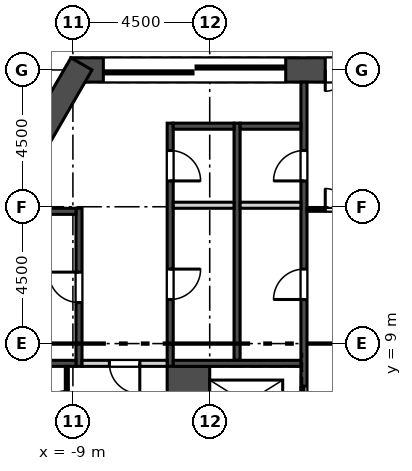
"""IFC4 building model, lengths in metres.
Left out: names, types, materials, properties, quantities, classifications, styles, units other than length and angle.
Written with IfcOpenShell. Run it as: python <this file> out.ifc"""

import sys

from ifc_helpers import new_model, si_unit, direction, frame, frame_2d, origin, place, context, subcontext, project, spatial, rectangle, extrude, element, fill, save


model = new_model("IFC4")
c1 = context("Model", 3, precision=1e-05, world=origin(), true_north=direction((0.0, 1.0)))
c2 = subcontext(c1, "Body", "Model", "MODEL_VIEW")
j1 = project(units=[si_unit("LENGTHUNIT", "METRE"), si_unit("PLANEANGLEUNIT", "RADIAN")], contexts=[c1])
p1 = place(None, origin())
s1 = spatial("IfcSite", under=j1, at=p1, CompositionType="ELEMENT")
p2 = place(p1, origin())
s2 = spatial("IfcBuilding", under=s1, at=p2, CompositionType="ELEMENT")
p3 = place(p2, frame((0.0, 0.0, 335.1)))
s3 = spatial("IfcBuildingStorey", under=s2, at=p3, CompositionType="ELEMENT", Elevation=335.1)
p4 = place(p3, frame((9.065, 18.0, 0.0), z_axis=(0.0, 0.0, 1.0), x_axis=(-1.0, 0.0, 0.0)))
e1 = element("IfcWall", 1, at=p4, inside=s3, PredefinedType="SHEAR", context=c2, shape_type="SweptSolid", body=[
    extrude(rectangle(XDim=18.13, YDim=0.8, at=frame_2d((9.065, 0.0))), origin(), (0.0, 0.0, 1.0), 4.2),
])
p5 = place(p4, frame((8.365, 0.0, 0.0)))
e2 = element("IfcOpeningElement", 2, at=p5, cuts=e1, PredefinedType="OPENING", context=c2, shape_type="SweptSolid", body=[
    extrude(rectangle(XDim=1.4, YDim=2.1, at=frame_2d((0.7, 1.05))), frame((0.0, 0.41, 0.0), z_axis=(0.0, -1.0, 0.0), x_axis=(1.0, 0.0, 0.0)), (0.0, 0.0, 1.0), 0.82),
])
p6 = place(p4, frame((11.065, 0.0, 0.0)))
e3 = element("IfcOpeningElement", 3, at=p6, cuts=e1, PredefinedType="OPENING", context=c2, shape_type="SweptSolid", body=[
    extrude(rectangle(XDim=6.0, YDim=2.4, at=frame_2d((3.0, 1.2))), frame((0.0, 0.41, 0.0), z_axis=(0.0, -1.0, 0.0), x_axis=(1.0, 0.0, 0.0)), (0.0, 0.0, 1.0), 0.82),
])
p7 = place(p4, frame((1.065, 0.0, 0.0)))
e4 = element("IfcOpeningElement", 4, at=p7, cuts=e1, PredefinedType="OPENING", context=c2, shape_type="SweptSolid", body=[
    extrude(rectangle(XDim=6.0, YDim=2.4, at=frame_2d((3.0, 1.2))), frame((0.0, 0.41, 0.0), z_axis=(0.0, -1.0, 0.0), x_axis=(1.0, 0.0, 0.0)), (0.0, 0.0, 1.0), 0.82),
])
p8 = place(p3, frame((-8.719, 18.2, 0.0), z_axis=(0.0, 0.0, 1.0), x_axis=(-0.500015780397, -0.866016292776, 0.0)))
e5 = element("IfcWall", 5, at=p8, inside=s3, PredefinedType="SHEAR", context=c2, shape_type="SweptSolid", body=[
    extrude(rectangle(XDim=8.67, YDim=0.8, at=frame_2d((4.335, 0.0))), origin(), (0.0, 0.0, 1.0), 4.2),
])
p9 = place(p3, frame((-4.353, 41.372, 0.0), z_axis=(0.0, 0.0, 1.0), x_axis=(-0.500001731347, -0.866024404189, 0.0)))
e6 = element("IfcWall", 6, at=p9, inside=s3, PredefinedType="SOLIDWALL", context=c2, shape_type="SweptSolid", body=[
    extrude(rectangle(XDim=38.87, YDim=0.34, at=frame_2d((19.435, 0.0))), origin(), (0.0, 0.0, 1.0), 3.8),
])
p10 = place(p9, frame((3.653, 0.0, 0.9)))
e7 = element("IfcOpeningElement", 7, at=p10, cuts=e6, PredefinedType="OPENING", context=c2, shape_type="SweptSolid", body=[
    extrude(rectangle(XDim=1.885, YDim=2.6, at=frame_2d((0.942, 1.3))), frame((0.0, 0.18, 0.0), z_axis=(0.0, -1.0, 0.0), x_axis=(1.0, 0.0, 0.0)), (0.0, 0.0, 1.0), 0.36),
])
p11 = place(p9, frame((6.653, 0.0, 0.9)))
e8 = element("IfcOpeningElement", 8, at=p11, cuts=e6, PredefinedType="OPENING", context=c2, shape_type="SweptSolid", body=[
    extrude(rectangle(XDim=1.885, YDim=2.6, at=frame_2d((0.942, 1.3))), frame((0.0, 0.18, 0.0), z_axis=(0.0, -1.0, 0.0), x_axis=(1.0, 0.0, 0.0)), (0.0, 0.0, 1.0), 0.36),
])
p12 = place(p9, frame((9.653, 0.0, 0.9)))
e9 = element("IfcOpeningElement", 9, at=p12, cuts=e6, PredefinedType="OPENING", context=c2, shape_type="SweptSolid", body=[
    extrude(rectangle(XDim=1.885, YDim=2.6, at=frame_2d((0.942, 1.3))), frame((0.0, 0.18, 0.0), z_axis=(0.0, -1.0, 0.0), x_axis=(1.0, 0.0, 0.0)), (0.0, 0.0, 1.0), 0.36),
])
p13 = place(p9, frame((12.653, 0.0, 0.9)))
e10 = element("IfcOpeningElement", 10, at=p13, cuts=e6, PredefinedType="OPENING", context=c2, shape_type="SweptSolid", body=[
    extrude(rectangle(XDim=1.885, YDim=2.6, at=frame_2d((0.942, 1.3))), frame((0.0, 0.18, 0.0), z_axis=(0.0, -1.0, 0.0), x_axis=(1.0, 0.0, 0.0)), (0.0, 0.0, 1.0), 0.36),
])
p14 = place(p9, frame((15.653, 0.0, 0.9)))
e11 = element("IfcOpeningElement", 11, at=p14, cuts=e6, PredefinedType="OPENING", context=c2, shape_type="SweptSolid", body=[
    extrude(rectangle(XDim=1.885, YDim=2.6, at=frame_2d((0.942, 1.3))), frame((0.0, 0.18, 0.0), z_axis=(0.0, -1.0, 0.0), x_axis=(1.0, 0.0, 0.0)), (0.0, 0.0, 1.0), 0.36),
])
p15 = place(p9, frame((18.653, 0.0, 0.9)))
e12 = element("IfcOpeningElement", 12, at=p15, cuts=e6, PredefinedType="OPENING", context=c2, shape_type="SweptSolid", body=[
    extrude(rectangle(XDim=1.885, YDim=2.6, at=frame_2d((0.942, 1.3))), frame((0.0, 0.18, 0.0), z_axis=(0.0, -1.0, 0.0), x_axis=(1.0, 0.0, 0.0)), (0.0, 0.0, 1.0), 0.36),
])
p16 = place(p9, frame((21.653, 0.0, 0.9)))
e13 = element("IfcOpeningElement", 13, at=p16, cuts=e6, PredefinedType="OPENING", context=c2, shape_type="SweptSolid", body=[
    extrude(rectangle(XDim=1.885, YDim=2.6, at=frame_2d((0.942, 1.3))), frame((0.0, 0.18, 0.0), z_axis=(0.0, -1.0, 0.0), x_axis=(1.0, 0.0, 0.0)), (0.0, 0.0, 1.0), 0.36),
])
p17 = place(p9, frame((24.653, 0.0, 0.9)))
e14 = element("IfcOpeningElement", 14, at=p17, cuts=e6, PredefinedType="OPENING", context=c2, shape_type="SweptSolid", body=[
    extrude(rectangle(XDim=1.885, YDim=2.6, at=frame_2d((0.942, 1.3))), frame((0.0, 0.18, 0.0), z_axis=(0.0, -1.0, 0.0), x_axis=(1.0, 0.0, 0.0)), (0.0, 0.0, 1.0), 0.36),
])
p18 = place(p9, frame((27.653, 0.0, 0.9)))
e15 = element("IfcOpeningElement", 15, at=p18, cuts=e6, PredefinedType="OPENING", context=c2, shape_type="SweptSolid", body=[
    extrude(rectangle(XDim=1.885, YDim=2.6, at=frame_2d((0.942, 1.3))), frame((0.0, 0.18, 0.0), z_axis=(0.0, -1.0, 0.0), x_axis=(1.0, 0.0, 0.0)), (0.0, 0.0, 1.0), 0.36),
])
p19 = place(p9, frame((30.653, 0.0, 0.9)))
e16 = element("IfcOpeningElement", 16, at=p19, cuts=e6, PredefinedType="OPENING", context=c2, shape_type="SweptSolid", body=[
    extrude(rectangle(XDim=1.885, YDim=2.6, at=frame_2d((0.942, 1.3))), frame((0.0, 0.18, 0.0), z_axis=(0.0, -1.0, 0.0), x_axis=(1.0, 0.0, 0.0)), (0.0, 0.0, 1.0), 0.36),
])
p20 = place(p9, frame((33.653, 0.0, 0.9)))
e17 = element("IfcOpeningElement", 17, at=p20, cuts=e6, PredefinedType="OPENING", context=c2, shape_type="SweptSolid", body=[
    extrude(rectangle(XDim=1.885, YDim=2.6, at=frame_2d((0.942, 1.3))), frame((0.0, 0.18, 0.0), z_axis=(0.0, -1.0, 0.0), x_axis=(1.0, 0.0, 0.0)), (0.0, 0.0, 1.0), 0.36),
])
p21 = place(p9, frame((1.269, 0.0, 0.9)))
e18 = element("IfcOpeningElement", 18, at=p21, cuts=e6, PredefinedType="OPENING", context=c2, shape_type="SweptSolid", body=[
    extrude(rectangle(XDim=1.115, YDim=2.4, at=frame_2d((0.558, 1.2))), frame((0.0, 0.18, 0.0), z_axis=(0.0, -1.0, 0.0), x_axis=(1.0, 0.0, 0.0)), (0.0, 0.0, 1.0), 0.36),
])
p22 = place(p9, frame((36.646, 0.0, 0.9)))
e19 = element("IfcOpeningElement", 19, at=p22, cuts=e6, PredefinedType="OPENING", context=c2, shape_type="SweptSolid", body=[
    extrude(rectangle(XDim=1.115, YDim=2.4, at=frame_2d((0.558, 1.2))), frame((0.0, 0.18, 0.0), z_axis=(0.0, -1.0, 0.0), x_axis=(1.0, 0.0, 0.0)), (0.0, 0.0, 1.0), 0.36),
])
p23 = place(p3, frame((-8.8, 8.25, -0.4), z_axis=(0.0, 0.0, 1.0), x_axis=(0.0, 1.0, 0.0)))
e20 = element("IfcWall", 20, at=p23, inside=s3, PredefinedType="SOLIDWALL", context=c2, shape_type="SweptSolid", body=[
    extrude(rectangle(XDim=5.2, YDim=0.2, at=frame_2d((2.6, 0.0))), origin(), (0.0, 0.0, 1.0), 4.2),
])
p24 = place(p23, frame((2.1, 0.0, 0.4)))
e21 = element("IfcOpeningElement", 21, at=p24, cuts=e20, PredefinedType="OPENING", context=c2, shape_type="SweptSolid", body=[
    extrude(rectangle(XDim=1.0, YDim=2.1, at=frame_2d((0.5, 1.05))), frame((0.0, 0.11, 0.0), z_axis=(0.0, -1.0, 0.0), x_axis=(1.0, 0.0, 0.0)), (0.0, 0.0, 1.0), 0.22),
])
p25 = place(p3, frame((-5.8, 8.25, -0.4), z_axis=(0.0, 0.0, 1.0), x_axis=(0.0, 1.0, 0.0)))
e22 = element("IfcWall", 22, at=p25, inside=s3, PredefinedType="SOLIDWALL", context=c2, shape_type="SweptSolid", body=[
    extrude(rectangle(XDim=8.0, YDim=0.2, at=frame_2d((4.0, 0.0))), origin(), (0.0, 0.0, 1.0), 4.2),
])
p26 = place(p25, frame((2.2, 0.0, 0.4)))
e23 = element("IfcOpeningElement", 23, at=p26, cuts=e22, PredefinedType="OPENING", context=c2, shape_type="SweptSolid", body=[
    extrude(rectangle(XDim=1.0, YDim=2.1, at=frame_2d((0.5, 1.05))), frame((0.0, 0.11, 0.0), z_axis=(0.0, -1.0, 0.0), x_axis=(1.0, 0.0, 0.0)), (0.0, 0.0, 1.0), 0.22),
])
p27 = place(p25, frame((6.1, 0.0, 0.4)))
e24 = element("IfcOpeningElement", 24, at=p27, cuts=e22, PredefinedType="OPENING", context=c2, shape_type="SweptSolid", body=[
    extrude(rectangle(XDim=1.0, YDim=2.1, at=frame_2d((0.5, 1.05))), frame((0.0, 0.11, 0.0), z_axis=(0.0, -1.0, 0.0), x_axis=(1.0, 0.0, 0.0)), (0.0, 0.0, 1.0), 0.22),
])
p28 = place(p3, frame((-3.6, 8.45, -0.4), z_axis=(0.0, 0.0, 1.0), x_axis=(0.0, 1.0, 0.0)))
e25 = element("IfcWall", 25, at=p28, inside=s3, PredefinedType="SOLIDWALL", context=c2, shape_type="SweptSolid", body=[
    extrude(rectangle(XDim=7.8, YDim=0.2, at=frame_2d((3.9, 0.0))), origin(), (0.0, 0.0, 1.0), 4.2),
])
p29 = place(p3, frame((-1.4, 5.85, -0.4), z_axis=(0.0, 0.0, 1.0), x_axis=(0.0, 1.0, 0.0)))
e26 = element("IfcWall", 26, at=p29, inside=s3, PredefinedType="SOLIDWALL", context=c2, shape_type="SweptSolid", body=[
    extrude(rectangle(XDim=11.75, YDim=0.2, at=frame_2d((5.875, 0.0))), origin(), (0.0, 0.0, 1.0), 4.2),
])
p30 = place(p29, frame((0.65, 0.0, 0.4)))
e27 = element("IfcOpeningElement", 27, at=p30, cuts=e26, PredefinedType="OPENING", context=c2, shape_type="SweptSolid", body=[
    extrude(rectangle(XDim=1.1, YDim=2.1, at=frame_2d((0.55, 1.05))), frame((0.0, 0.11, 0.0), z_axis=(0.0, -1.0, 0.0), x_axis=(1.0, 0.0, 0.0)), (0.0, 0.0, 1.0), 0.22),
])
p31 = place(p29, frame((4.6, 0.0, 0.4)))
e28 = element("IfcOpeningElement", 28, at=p31, cuts=e26, PredefinedType="OPENING", context=c2, shape_type="SweptSolid", body=[
    extrude(rectangle(XDim=1.0, YDim=2.1, at=frame_2d((0.5, 1.05))), frame((0.0, 0.11, 0.0), z_axis=(0.0, -1.0, 0.0), x_axis=(1.0, 0.0, 0.0)), (0.0, 0.0, 1.0), 0.22),
])
p32 = place(p29, frame((8.5, 0.0, 0.4)))
e29 = element("IfcOpeningElement", 29, at=p32, cuts=e26, PredefinedType="OPENING", context=c2, shape_type="SweptSolid", body=[
    extrude(rectangle(XDim=1.0, YDim=2.1, at=frame_2d((0.5, 1.05))), frame((0.0, 0.11, 0.0), z_axis=(0.0, -1.0, 0.0), x_axis=(1.0, 0.0, 0.0)), (0.0, 0.0, 1.0), 0.22),
])
p33 = place(p3, frame((-5.2, 5.85, -0.4), z_axis=(0.0, 0.0, 1.0), x_axis=(0.0, 1.0, 0.0)))
e30 = element("IfcWall", 30, at=p33, inside=s3, PredefinedType="SOLIDWALL", context=c2, shape_type="SweptSolid", body=[
    extrude(rectangle(XDim=2.4, YDim=1.4, at=frame_2d((1.2, 0.0))), origin(), (0.0, 0.0, 1.0), 4.2),
])
p34 = place(p3, frame((-10.9, 8.35, -0.4), z_axis=(0.0, 0.0, 1.0), x_axis=(1.0, 0.0, 0.0)))
e31 = element("IfcWall", 31, at=p34, inside=s3, PredefinedType="SOLIDWALL", context=c2, shape_type="SweptSolid", body=[
    extrude(rectangle(XDim=2.0, YDim=0.2, at=frame_2d((1.0, 0.0))), origin(), (0.0, 0.0, 1.0), 4.2),
])
p35 = place(p3, frame((-5.7, 8.35, -0.4), z_axis=(0.0, 0.0, 1.0), x_axis=(1.0, 0.0, 0.0)))
e32 = element("IfcWall", 32, at=p35, inside=s3, PredefinedType="SOLIDWALL", context=c2, shape_type="SweptSolid", body=[
    extrude(rectangle(XDim=4.2, YDim=0.2, at=frame_2d((2.1, 0.0))), origin(), (0.0, 0.0, 1.0), 4.2),
])
p36 = place(p3, frame((-10.9, 13.35, -0.4), z_axis=(0.0, 0.0, 1.0), x_axis=(1.0, 0.0, 0.0)))
e33 = element("IfcWall", 33, at=p36, inside=s3, PredefinedType="SOLIDWALL", context=c2, shape_type="SweptSolid", body=[
    extrude(rectangle(XDim=2.0, YDim=0.2, at=frame_2d((1.0, 0.0))), origin(), (0.0, 0.0, 1.0), 4.2),
])
p37 = place(p3, frame((-5.7, 13.55, 0.0), z_axis=(0.0, 0.0, 1.0), x_axis=(1.0, 0.0, 0.0)))
e34 = element("IfcWall", 34, at=p37, inside=s3, PredefinedType="SOLIDWALL", context=c2, shape_type="SweptSolid", body=[
    extrude(rectangle(XDim=2.0, YDim=0.2, at=frame_2d((1.0, 0.0))), origin(), (0.0, 0.0, 1.0), 3.8),
])
p38 = place(p3, frame((-5.7, 16.15, -0.4), z_axis=(0.0, 0.0, 1.0), x_axis=(1.0, 0.0, 0.0)))
e35 = element("IfcWall", 35, at=p38, inside=s3, PredefinedType="SOLIDWALL", context=c2, shape_type="SweptSolid", body=[
    extrude(rectangle(XDim=2.0, YDim=0.2, at=frame_2d((1.0, 0.0))), origin(), (0.0, 0.0, 1.0), 4.2),
])
p39 = place(p3, frame((-3.5, 13.55, 0.0), z_axis=(0.0, 0.0, 1.0), x_axis=(1.0, 0.0, 0.0)))
e36 = element("IfcWall", 36, at=p39, inside=s3, PredefinedType="SOLIDWALL", context=c2, shape_type="SweptSolid", body=[
    extrude(rectangle(XDim=2.0, YDim=0.2, at=frame_2d((1.0, 0.0))), origin(), (0.0, 0.0, 1.0), 3.8),
])
p40 = place(p3, frame((-3.5, 16.15, -0.4), z_axis=(0.0, 0.0, 1.0), x_axis=(1.0, 0.0, 0.0)))
e37 = element("IfcWall", 37, at=p40, inside=s3, PredefinedType="SOLIDWALL", context=c2, shape_type="SweptSolid", body=[
    extrude(rectangle(XDim=2.0, YDim=0.2, at=frame_2d((1.0, 0.0))), origin(), (0.0, 0.0, 1.0), 4.2),
])
p41 = place(p3, frame((-9.2, 5.85, 0.0), z_axis=(0.0, 0.0, 1.0), x_axis=(0.0, 1.0, 0.0)))
e38 = element("IfcWall", 38, at=p41, inside=s3, PredefinedType="PARTITIONING", context=c2, shape_type="SweptSolid", body=[
    extrude(rectangle(XDim=2.4, YDim=0.1, at=frame_2d((1.2, 0.0))), origin(), (0.0, 0.0, 1.0), 3.8),
])
p42 = place(p41, frame((0.7, 0.0, 0.0)))
e39 = element("IfcOpeningElement", 39, at=p42, cuts=e38, PredefinedType="OPENING", context=c2, shape_type="SweptSolid", body=[
    extrude(rectangle(XDim=0.9, YDim=2.1, at=frame_2d((0.45, 1.05))), frame((0.0, 0.06, 0.0), z_axis=(0.0, -1.0, 0.0), x_axis=(1.0, 0.0, 0.0)), (0.0, 0.0, 1.0), 0.12),
])
p43 = place(p3, frame((-8.7, 8.35, 0.0), z_axis=(0.0, 0.0, 1.0), x_axis=(1.0, 0.0, 0.0)))
e40 = element("IfcWall", 40, at=p43, inside=s3, PredefinedType="SOLIDWALL", context=c2, shape_type="SweptSolid", body=[
    extrude(rectangle(XDim=2.8, YDim=0.2, at=frame_2d((1.4, 0.0))), origin(), (0.0, 0.0, 1.0), 3.8),
])
p44 = place(p43, frame((0.9, 0.0, 0.0)))
e41 = element("IfcOpeningElement", 41, at=p44, cuts=e40, PredefinedType="OPENING", context=c2, shape_type="SweptSolid", body=[
    extrude(rectangle(XDim=1.0, YDim=2.1, at=frame_2d((0.5, 1.05))), frame((0.0, 0.11, 0.0), z_axis=(0.0, -1.0, 0.0), x_axis=(1.0, 0.0, 0.0)), (0.0, 0.0, 1.0), 0.22),
])
p45 = place(p3, frame((-1.3, 13.4, 0.0), z_axis=(0.0, 0.0, 1.0), x_axis=(1.0, 0.0, 0.0)))
e42 = element("IfcWall", 42, at=p45, inside=s3, PredefinedType="PARTITIONING", context=c2, shape_type="SweptSolid", body=[
    extrude(rectangle(XDim=2.6, YDim=0.1, at=frame_2d((1.3, 0.0))), origin(), (0.0, 0.0, 1.0), 3.8),
])
p46 = place(p45, frame((0.6, 0.0, 0.0)))
e43 = element("IfcOpeningElement", 43, at=p46, cuts=e42, PredefinedType="OPENING", context=c2, shape_type="SweptSolid", body=[
    extrude(rectangle(XDim=1.4, YDim=2.1, at=frame_2d((0.7, 1.05))), frame((0.0, 0.06, 0.0), z_axis=(0.0, -1.0, 0.0), x_axis=(1.0, 0.0, 0.0)), (0.0, 0.0, 1.0), 0.12),
])
p47 = place(p30, origin())
e44 = element("IfcDoor", 44, at=p47, inside=s3, OperationType="SLIDING_TO_RIGHT", PredefinedType="DOOR", context=c2, shape_type="SweptSolid", body=[
    extrude(rectangle(XDim=1.1, YDim=2.1, at=frame_2d((0.55, 1.05))), frame((0.0, 0.025, 0.0), z_axis=(0.0, -1.0, 0.0), x_axis=(1.0, 0.0, 0.0)), (0.0, 0.0, 1.0), 0.05),
])
fill(e27, e44)
p48 = place(p24, origin())
e45 = element("IfcDoor", 45, at=p48, inside=s3, OperationType="SINGLE_SWING_RIGHT", PredefinedType="DOOR", context=c2, shape_type="SweptSolid", body=[
    extrude(rectangle(XDim=1.0, YDim=2.1, at=frame_2d((0.5, 1.05))), frame((0.0, 0.025, 0.0), z_axis=(0.0, -1.0, 0.0), x_axis=(1.0, 0.0, 0.0)), (0.0, 0.0, 1.0), 0.05),
])
fill(e21, e45)
p49 = place(p26, frame((1.0, 0.0, 0.0), z_axis=(0.0, 0.0, 1.0), x_axis=(-1.0, 0.0, 0.0)))
e46 = element("IfcDoor", 46, at=p49, inside=s3, OperationType="SINGLE_SWING_LEFT", PredefinedType="DOOR", context=c2, shape_type="SweptSolid", body=[
    extrude(rectangle(XDim=1.0, YDim=2.1, at=frame_2d((0.5, 1.05))), frame((0.0, 0.025, 0.0), z_axis=(0.0, -1.0, 0.0), x_axis=(1.0, 0.0, 0.0)), (0.0, 0.0, 1.0), 0.05),
])
fill(e23, e46)
p50 = place(p27, frame((1.0, 0.0, 0.0), z_axis=(0.0, 0.0, 1.0), x_axis=(-1.0, 0.0, 0.0)))
e47 = element("IfcDoor", 47, at=p50, inside=s3, OperationType="SINGLE_SWING_RIGHT", PredefinedType="DOOR", context=c2, shape_type="SweptSolid", body=[
    extrude(rectangle(XDim=1.0, YDim=2.1, at=frame_2d((0.5, 1.05))), frame((0.0, 0.025, 0.0), z_axis=(0.0, -1.0, 0.0), x_axis=(1.0, 0.0, 0.0)), (0.0, 0.0, 1.0), 0.05),
])
fill(e24, e47)
p51 = place(p31, origin())
e48 = element("IfcDoor", 48, at=p51, inside=s3, OperationType="SINGLE_SWING_LEFT", PredefinedType="DOOR", context=c2, shape_type="SweptSolid", body=[
    extrude(rectangle(XDim=1.0, YDim=2.1, at=frame_2d((0.5, 1.05))), frame((0.0, 0.025, 0.0), z_axis=(0.0, -1.0, 0.0), x_axis=(1.0, 0.0, 0.0)), (0.0, 0.0, 1.0), 0.05),
])
fill(e28, e48)
p52 = place(p32, origin())
e49 = element("IfcDoor", 49, at=p52, inside=s3, OperationType="SINGLE_SWING_LEFT", PredefinedType="DOOR", context=c2, shape_type="SweptSolid", body=[
    extrude(rectangle(XDim=1.0, YDim=2.1, at=frame_2d((0.5, 1.05))), frame((0.0, 0.025, 0.0), z_axis=(0.0, -1.0, 0.0), x_axis=(1.0, 0.0, 0.0)), (0.0, 0.0, 1.0), 0.05),
])
fill(e29, e49)
p53 = place(p44, frame((1.0, 0.0, 0.0), z_axis=(0.0, 0.0, 1.0), x_axis=(-1.0, 0.0, 0.0)))
e50 = element("IfcDoor", 50, at=p53, inside=s3, OperationType="SINGLE_SWING_LEFT", PredefinedType="DOOR", context=c2, shape_type="SweptSolid", body=[
    extrude(rectangle(XDim=1.0, YDim=2.1, at=frame_2d((0.5, 1.05))), frame((0.0, 0.025, 0.0), z_axis=(0.0, -1.0, 0.0), x_axis=(1.0, 0.0, 0.0)), (0.0, 0.0, 1.0), 0.05),
])
fill(e41, e50)
p54 = place(p46, origin())
e51 = element("IfcDoor", 51, at=p54, inside=s3, OperationType="DOUBLE_DOOR_SINGLE_SWING", PredefinedType="DOOR", context=c2, shape_type="SweptSolid", body=[
    extrude(rectangle(XDim=1.4, YDim=2.1, at=frame_2d((0.7, 1.05))), frame((0.0, 0.025, 0.0), z_axis=(0.0, -1.0, 0.0), x_axis=(1.0, 0.0, 0.0)), (0.0, 0.0, 1.0), 0.05),
])
fill(e43, e51)
p55 = place(p5, origin())
e52 = element("IfcDoor", 52, at=p55, inside=s3, OperationType="DOUBLE_DOOR_SINGLE_SWING", PredefinedType="DOOR", context=c2, shape_type="SweptSolid", body=[
    extrude(rectangle(XDim=1.4, YDim=2.1, at=frame_2d((0.7, 1.05))), frame((0.0, 0.025, 0.0), z_axis=(0.0, -1.0, 0.0), x_axis=(1.0, 0.0, 0.0)), (0.0, 0.0, 1.0), 0.05),
])
fill(e2, e52)
p56 = place(p6, origin())
e53 = element("IfcDoor", 53, at=p56, inside=s3, OperationType="DOUBLE_DOOR_SLIDING", PredefinedType="DOOR", context=c2, shape_type="SweptSolid", body=[
    extrude(rectangle(XDim=6.0, YDim=2.4, at=frame_2d((3.0, 1.2))), frame((0.0, 0.025, 0.0), z_axis=(0.0, -1.0, 0.0), x_axis=(1.0, 0.0, 0.0)), (0.0, 0.0, 1.0), 0.05),
])
fill(e3, e53)
save(model, sys.argv[1])
